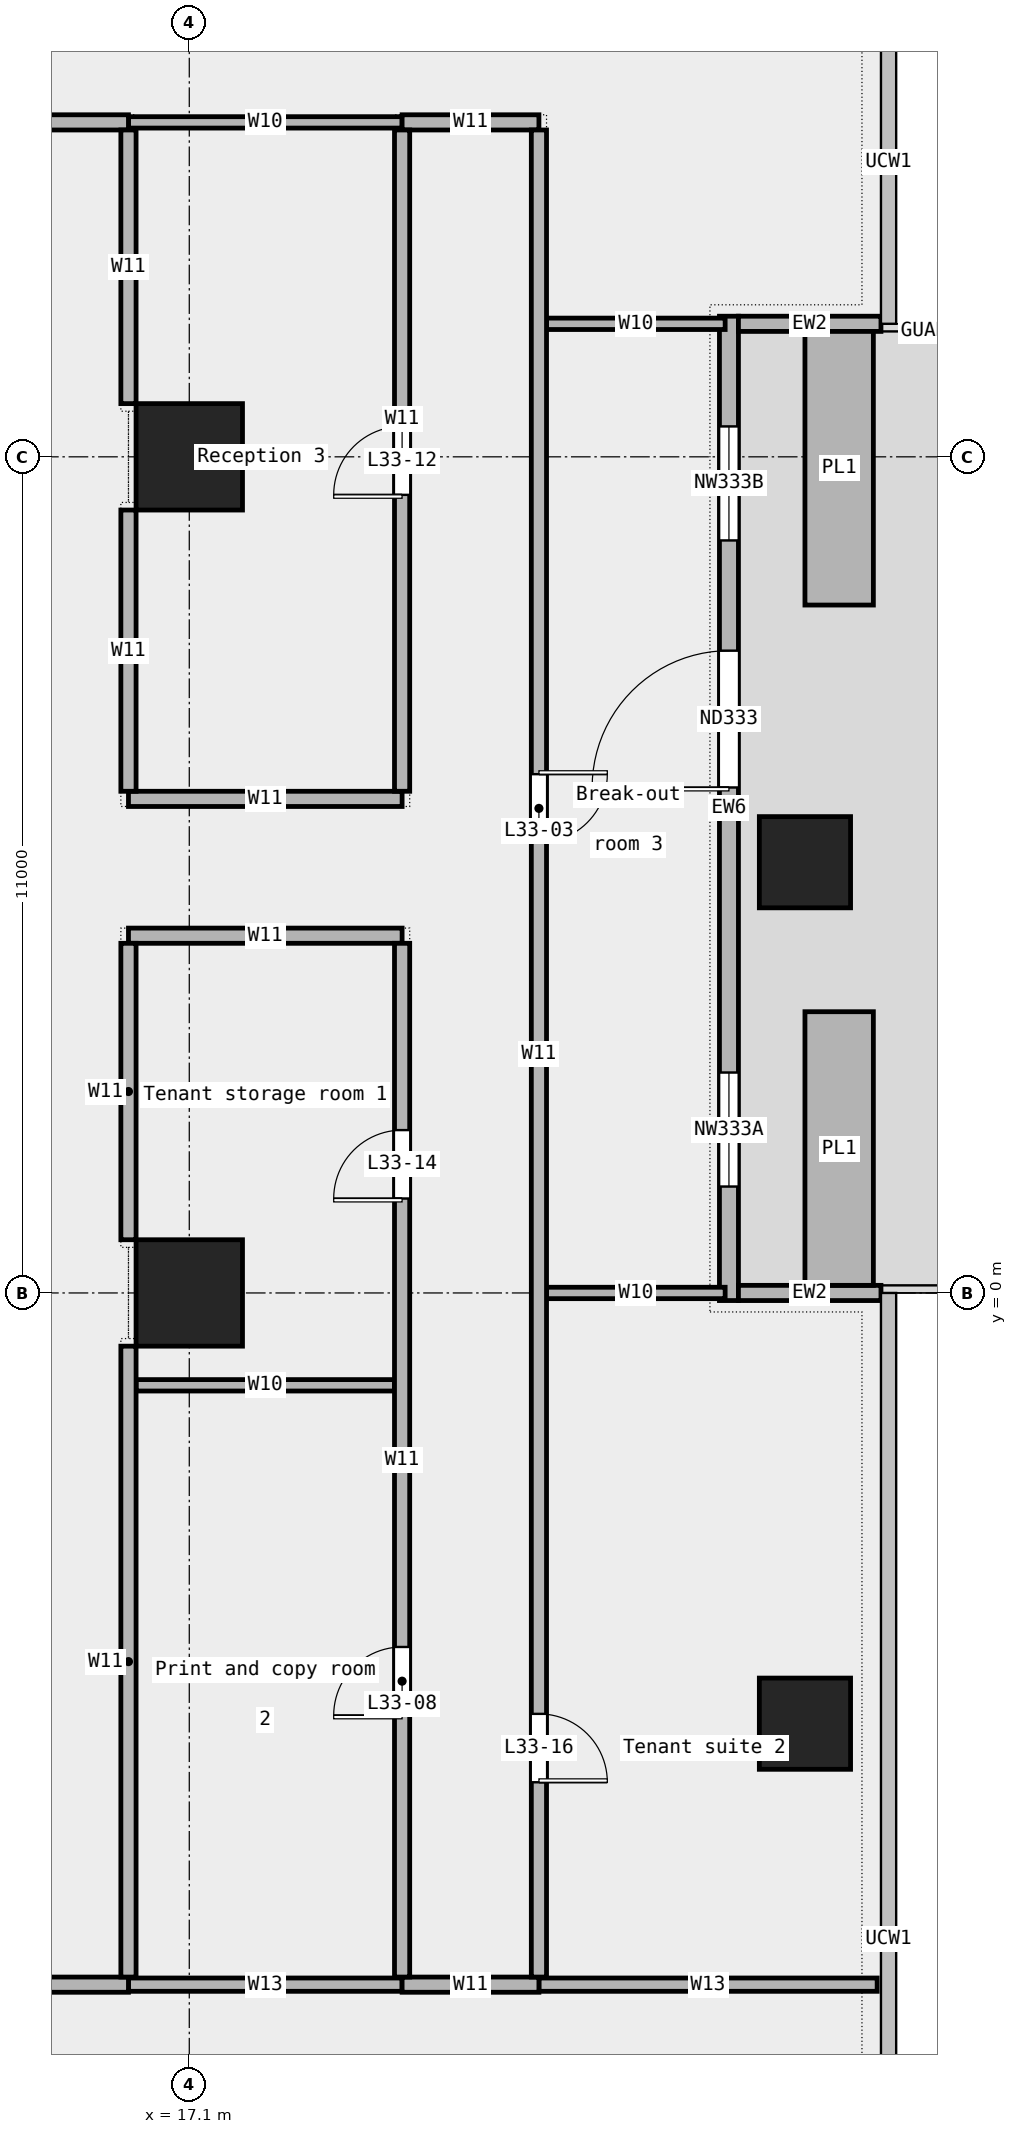
"""IFC4 building model, lengths in metres.
Left out: names, types, materials, properties, quantities, classifications, styles, units other than length and angle.
Written with IfcOpenShell. Run it as: python <this file> out.ifc"""

import sys

from ifc_helpers import new_model, si_unit, direction, frame, frame_2d, origin, origin_2d, place, context, subcontext, project, spatial, rectangle, extrude, element, fill, save


model = new_model("IFC4")
c1 = context("Model", 3, precision=1e-05, world=origin(), true_north=direction((0.0, 1.0)))
c2 = subcontext(c1, "Body", "Model", "MODEL_VIEW")
j1 = project(units=[si_unit("LENGTHUNIT", "METRE"), si_unit("PLANEANGLEUNIT", "RADIAN")], contexts=[c1])
p1 = place(None, origin())
s1 = spatial("IfcSite", under=j1, at=p1, CompositionType="ELEMENT")
p2 = place(p1, origin())
s2 = spatial("IfcBuilding", under=s1, at=p2, CompositionType="ELEMENT")
p3 = place(p2, frame((0.0, 0.0, 165.0)))
s3 = spatial("IfcBuildingStorey", under=s2, at=p3, CompositionType="ELEMENT", Elevation=165.0)
for number, where, z_axis, x_axis in (
    (1, (25.2, -5.667, 0.0), (0.0, 0.0, 1.0), (1.0, 0.0, 0.0)),
    (2, (25.2, 5.667, 0.0), (0.0, 0.0, 1.0), (1.0, 0.0, 0.0)),
):
    element("IfcColumn", number, at=place(p3, frame(where, z_axis=z_axis, x_axis=x_axis)), inside=s3, PredefinedType="COLUMN", context=c2, shape_type="SweptSolid", body=[
        extrude(rectangle(XDim=1.2, YDim=1.2, at=origin_2d()), origin(), (0.0, 0.0, 1.0), 3.6),
    ])
for number, where, z_axis, x_axis in (
    (3, (17.1, 0.0, 0.0), (0.0, 0.0, 1.0), (1.0, 0.0, 0.0)),
    (4, (17.1, 11.0, 0.0), (0.0, 0.0, 1.0), (1.0, 0.0, 0.0)),
):
    element("IfcColumn", number, at=place(p3, frame(where, z_axis=z_axis, x_axis=x_axis)), inside=s3, PredefinedType="COLUMN", context=c2, shape_type="SweptSolid", body=[
        extrude(rectangle(XDim=1.4, YDim=1.4, at=origin_2d()), origin(), (0.0, 0.0, 1.0), 3.6),
    ])
p4 = place(p3, frame((24.2, -0.1, 0.0), z_axis=(0.0, 0.0, 1.0), x_axis=(0.0, 1.0, 0.0)))
e5 = element("IfcWall", 5, at=p4, inside=s3, PredefinedType="STANDARD", context=c2, shape_type="SweptSolid", body=[
    extrude(rectangle(XDim=12.95, YDim=0.25, at=frame_2d((6.475, 0.0))), origin(), (0.0, 0.0, 1.0), 3.6),
])
p5 = place(p4, frame((1.5, 0.0, 0.45)))
e6 = element("IfcOpeningElement", 6, at=p5, cuts=e5, PredefinedType="OPENING", context=c2, shape_type="SweptSolid", body=[
    extrude(rectangle(XDim=1.5, YDim=2.4, at=frame_2d((0.75, 1.2))), frame((0.0, 0.137, 0.0), z_axis=(0.0, -1.0, 0.0), x_axis=(1.0, 0.0, 0.0)), (0.0, 0.0, 1.0), 0.274),
])
p6 = place(p4, frame((6.75, 0.0, 0.0)))
e7 = element("IfcOpeningElement", 7, at=p6, cuts=e5, PredefinedType="OPENING", context=c2, shape_type="SweptSolid", body=[
    extrude(rectangle(XDim=1.8, YDim=2.4, at=frame_2d((0.9, 1.2))), frame((0.0, 0.137, 0.0), z_axis=(0.0, -1.0, 0.0), x_axis=(1.0, 0.0, 0.0)), (0.0, 0.0, 1.0), 0.274),
])
p7 = place(p4, frame((10.0, 0.0, 0.45)))
e8 = element("IfcOpeningElement", 8, at=p7, cuts=e5, PredefinedType="OPENING", context=c2, shape_type="SweptSolid", body=[
    extrude(rectangle(XDim=1.5, YDim=2.4, at=frame_2d((0.75, 1.2))), frame((0.0, 0.137, 0.0), z_axis=(0.0, -1.0, 0.0), x_axis=(1.0, 0.0, 0.0)), (0.0, 0.0, 1.0), 0.274),
])
for number, where, z_axis, x_axis in (
    (9, (26.2, 0.0, 0.0), (0.0, 0.0, 1.0), (-1.0, 0.0, 0.0)),
    (10, (26.2, 12.75, 0.0), (0.0, 0.0, 1.0), (-1.0, 0.0, 0.0)),
):
    element("IfcWall", number, at=place(p3, frame(where, z_axis=z_axis, x_axis=x_axis)), inside=s3, PredefinedType="STANDARD", context=c2, shape_type="SweptSolid", body=[
        extrude(rectangle(XDim=1.875, YDim=0.2, at=frame_2d((0.938, 0.0))), origin(), (0.0, 0.0, 1.0), 3.6),
    ])
for number, where, z_axis, x_axis in (
    (11, (25.65, 0.1, 0.0), (0.0, 0.0, 1.0), (0.0, 1.0, 0.0)),
    (12, (25.65, 9.05, 0.0), (0.0, 0.0, 1.0), (0.0, 1.0, 0.0)),
):
    element("IfcWall", number, at=place(p3, frame(where, z_axis=z_axis, x_axis=x_axis)), inside=s3, PredefinedType="STANDARD", context=c2, shape_type="SweptSolid", body=[
        extrude(rectangle(XDim=3.6, YDim=0.9, at=frame_2d((1.8, 0.0))), origin(), (0.0, 0.0, 1.0), 0.7),
    ])
p8 = place(p3, frame((16.3, -9.1, 0.0), z_axis=(0.0, 0.0, 1.0), x_axis=(1.0, 0.0, 0.0)))
e13 = element("IfcWall", 13, at=p8, inside=s3, PredefinedType="PARTITIONING", context=c2, shape_type="SweptSolid", body=[
    extrude(rectangle(XDim=3.6, YDim=0.175, at=frame_2d((1.8, 0.0))), origin(), (0.0, 0.0, 1.0), 3.6),
])
p9 = place(p3, frame((21.7, -9.1, 0.0), z_axis=(0.0, 0.0, 1.0), x_axis=(1.0, 0.0, 0.0)))
e14 = element("IfcWall", 14, at=p9, inside=s3, PredefinedType="PARTITIONING", context=c2, shape_type="SweptSolid", body=[
    extrude(rectangle(XDim=4.45, YDim=0.175, at=frame_2d((2.225, 0.0))), origin(), (0.0, 0.0, 1.0), 3.6),
])
p10 = place(p3, frame((-9.48, -9.1, 0.0), z_axis=(0.0, 0.0, 1.0), x_axis=(1.0, 0.0, 0.0)))
e15 = element("IfcWall", 15, at=p10, inside=s3, PredefinedType="PARTITIONING", context=c2, shape_type="SweptSolid", body=[
    extrude(rectangle(XDim=25.78, YDim=0.2, at=frame_2d((12.89, 0.0))), origin(), (0.0, 0.0, 1.0), 3.6),
])
p11 = place(p3, frame((19.9, -9.1, 0.0), z_axis=(0.0, 0.0, 1.0), x_axis=(1.0, 0.0, 0.0)))
e16 = element("IfcWall", 16, at=p11, inside=s3, PredefinedType="PARTITIONING", context=c2, shape_type="SweptSolid", body=[
    extrude(rectangle(XDim=1.8, YDim=0.2, at=frame_2d((0.9, 0.0))), origin(), (0.0, 0.0, 1.0), 3.6),
])
p12 = place(p3, frame((16.4, -1.215, 0.0), z_axis=(0.0, 0.0, 1.0), x_axis=(1.0, 0.0, 0.0)))
e17 = element("IfcWall", 17, at=p12, inside=s3, PredefinedType="PARTITIONING", context=c2, shape_type="SweptSolid", body=[
    extrude(rectangle(XDim=3.4, YDim=0.15, at=frame_2d((1.7, 0.0))), origin(), (0.0, 0.0, 1.0), 3.6),
])
p13 = place(p3, frame((21.8, 0.0, 0.0), z_axis=(0.0, 0.0, 1.0), x_axis=(1.0, 0.0, 0.0)))
e18 = element("IfcWall", 18, at=p13, inside=s3, PredefinedType="PARTITIONING", context=c2, shape_type="SweptSolid", body=[
    extrude(rectangle(XDim=2.35, YDim=0.15, at=frame_2d((1.175, 0.0))), origin(), (0.0, 0.0, 1.0), 3.6),
])
for number, where, z_axis, x_axis in (
    (19, (16.3, 4.7, 0.0), (0.0, 0.0, 1.0), (1.0, 0.0, 0.0)),
    (20, (16.3, 6.5, 0.0), (0.0, 0.0, 1.0), (1.0, 0.0, 0.0)),
):
    element("IfcWall", number, at=place(p3, frame(where, z_axis=z_axis, x_axis=x_axis)), inside=s3, PredefinedType="PARTITIONING", context=c2, shape_type="SweptSolid", body=[
        extrude(rectangle(XDim=3.6, YDim=0.2, at=frame_2d((1.8, 0.0))), origin(), (0.0, 0.0, 1.0), 3.6),
    ])
p14 = place(p3, frame((21.8, 12.75, 0.0), z_axis=(0.0, 0.0, 1.0), x_axis=(1.0, 0.0, 0.0)))
e21 = element("IfcWall", 21, at=p14, inside=s3, PredefinedType="PARTITIONING", context=c2, shape_type="SweptSolid", body=[
    extrude(rectangle(XDim=2.35, YDim=0.15, at=frame_2d((1.175, 0.0))), origin(), (0.0, 0.0, 1.0), 3.6),
])
p15 = place(p3, frame((16.3, 15.4, 0.0), z_axis=(0.0, 0.0, 1.0), x_axis=(1.0, 0.0, 0.0)))
e22 = element("IfcWall", 22, at=p15, inside=s3, PredefinedType="PARTITIONING", context=c2, shape_type="SweptSolid", body=[
    extrude(rectangle(XDim=3.6, YDim=0.15, at=frame_2d((1.8, 0.0))), origin(), (0.0, 0.0, 1.0), 3.6),
])
p16 = place(p3, frame((-16.3, 15.4, 0.0), z_axis=(0.0, 0.0, 1.0), x_axis=(1.0, 0.0, 0.0)))
e23 = element("IfcWall", 23, at=p16, inside=s3, PredefinedType="PARTITIONING", context=c2, shape_type="SweptSolid", body=[
    extrude(rectangle(XDim=32.6, YDim=0.2, at=frame_2d((16.3, 0.0))), origin(), (0.0, 0.0, 1.0), 3.6),
])
p17 = place(p16, frame((24.992, 0.0, 0.0)))
e24 = element("IfcOpeningElement", 24, at=p17, cuts=e23, PredefinedType="OPENING", context=c2, shape_type="SweptSolid", body=[
    extrude(rectangle(XDim=1.8, YDim=2.1, at=frame_2d((0.9, 1.05))), frame((0.0, 0.112, 0.0), z_axis=(0.0, -1.0, 0.0), x_axis=(1.0, 0.0, 0.0)), (0.0, 0.0, 1.0), 0.224),
])
p18 = place(p16, frame((9.635, 0.0, 0.0)))
e25 = element("IfcOpeningElement", 25, at=p18, cuts=e23, PredefinedType="OPENING", context=c2, shape_type="SweptSolid", body=[
    extrude(rectangle(XDim=1.8, YDim=2.1, at=frame_2d((0.9, 1.05))), frame((0.0, 0.112, 0.0), z_axis=(0.0, -1.0, 0.0), x_axis=(1.0, 0.0, 0.0)), (0.0, 0.0, 1.0), 0.224),
])
p19 = place(p3, frame((19.9, 15.4, 0.0), z_axis=(0.0, 0.0, 1.0), x_axis=(1.0, 0.0, 0.0)))
e26 = element("IfcWall", 26, at=p19, inside=s3, PredefinedType="PARTITIONING", context=c2, shape_type="SweptSolid", body=[
    extrude(rectangle(XDim=1.8, YDim=0.2, at=frame_2d((0.9, 0.0))), origin(), (0.0, 0.0, 1.0), 3.6),
])
p20 = place(p3, frame((16.3, -9.0, 0.0), z_axis=(0.0, 0.0, 1.0), x_axis=(0.0, 1.0, 0.0)))
e27 = element("IfcWall", 27, at=p20, inside=s3, PredefinedType="PARTITIONING", context=c2, shape_type="SweptSolid", body=[
    extrude(rectangle(XDim=8.3, YDim=0.2, at=frame_2d((4.15, 0.0))), origin(), (0.0, 0.0, 1.0), 3.6),
])
p21 = place(p3, frame((16.3, 0.7, 0.0), z_axis=(0.0, 0.0, 1.0), x_axis=(0.0, 1.0, 0.0)))
e28 = element("IfcWall", 28, at=p21, inside=s3, PredefinedType="PARTITIONING", context=c2, shape_type="SweptSolid", body=[
    extrude(rectangle(XDim=3.9, YDim=0.2, at=frame_2d((1.95, 0.0))), origin(), (0.0, 0.0, 1.0), 3.6),
])
p22 = place(p3, frame((16.3, 6.6, 0.0), z_axis=(0.0, 0.0, 1.0), x_axis=(0.0, 1.0, 0.0)))
e29 = element("IfcWall", 29, at=p22, inside=s3, PredefinedType="PARTITIONING", context=c2, shape_type="SweptSolid", body=[
    extrude(rectangle(XDim=3.7, YDim=0.2, at=frame_2d((1.85, 0.0))), origin(), (0.0, 0.0, 1.0), 3.6),
])
p23 = place(p3, frame((16.3, 11.7, 0.0), z_axis=(0.0, 0.0, 1.0), x_axis=(0.0, 1.0, 0.0)))
e30 = element("IfcWall", 30, at=p23, inside=s3, PredefinedType="PARTITIONING", context=c2, shape_type="SweptSolid", body=[
    extrude(rectangle(XDim=3.6, YDim=0.2, at=frame_2d((1.8, 0.0))), origin(), (0.0, 0.0, 1.0), 3.6),
])
p24 = place(p3, frame((19.9, -9.0, 0.0), z_axis=(0.0, 0.0, 1.0), x_axis=(0.0, 1.0, 0.0)))
e31 = element("IfcWall", 31, at=p24, inside=s3, PredefinedType="PARTITIONING", context=c2, shape_type="SweptSolid", body=[
    extrude(rectangle(XDim=13.6, YDim=0.2, at=frame_2d((6.8, 0.0))), origin(), (0.0, 0.0, 1.0), 3.6),
])
p25 = place(p24, frame((3.442, 0.0, 0.0)))
e32 = element("IfcOpeningElement", 32, at=p25, cuts=e31, PredefinedType="OPENING", context=c2, shape_type="SweptSolid", body=[
    extrude(rectangle(XDim=0.9, YDim=2.1, at=frame_2d((0.45, 1.05))), frame((0.0, 0.112, 0.0), z_axis=(0.0, -1.0, 0.0), x_axis=(1.0, 0.0, 0.0)), (0.0, 0.0, 1.0), 0.224),
])
p26 = place(p24, frame((10.242, 0.0, 0.0)))
e33 = element("IfcOpeningElement", 33, at=p26, cuts=e31, PredefinedType="OPENING", context=c2, shape_type="SweptSolid", body=[
    extrude(rectangle(XDim=0.9, YDim=2.1, at=frame_2d((0.45, 1.05))), frame((0.0, 0.112, 0.0), z_axis=(0.0, -1.0, 0.0), x_axis=(1.0, 0.0, 0.0)), (0.0, 0.0, 1.0), 0.224),
])
p27 = place(p3, frame((19.9, 6.6, 0.0), z_axis=(0.0, 0.0, 1.0), x_axis=(0.0, 1.0, 0.0)))
e34 = element("IfcWall", 34, at=p27, inside=s3, PredefinedType="PARTITIONING", context=c2, shape_type="SweptSolid", body=[
    extrude(rectangle(XDim=8.7, YDim=0.2, at=frame_2d((4.35, 0.0))), origin(), (0.0, 0.0, 1.0), 3.6),
])
p28 = place(p27, frame((3.9, 0.0, 0.0)))
e35 = element("IfcOpeningElement", 35, at=p28, cuts=e34, PredefinedType="OPENING", context=c2, shape_type="SweptSolid", body=[
    extrude(rectangle(XDim=0.9, YDim=2.1, at=frame_2d((0.45, 1.05))), frame((0.0, 0.112, 0.0), z_axis=(0.0, -1.0, 0.0), x_axis=(1.0, 0.0, 0.0)), (0.0, 0.0, 1.0), 0.224),
])
p29 = place(p3, frame((21.7, -9.0, 0.0), z_axis=(0.0, 0.0, 1.0), x_axis=(0.0, 1.0, 0.0)))
e36 = element("IfcWall", 36, at=p29, inside=s3, PredefinedType="PARTITIONING", context=c2, shape_type="SweptSolid", body=[
    extrude(rectangle(XDim=24.3, YDim=0.2, at=frame_2d((12.15, 0.0))), origin(), (0.0, 0.0, 1.0), 3.6),
])
p30 = place(p29, frame((14.925, 0.0, 0.0)))
e37 = element("IfcOpeningElement", 37, at=p30, cuts=e36, PredefinedType="OPENING", context=c2, shape_type="SweptSolid", body=[
    extrude(rectangle(XDim=0.9, YDim=2.1, at=frame_2d((0.45, 1.05))), frame((0.0, 0.112, 0.0), z_axis=(0.0, -1.0, 0.0), x_axis=(1.0, 0.0, 0.0)), (0.0, 0.0, 1.0), 0.224),
])
p31 = place(p29, frame((2.562, 0.0, 0.0)))
e38 = element("IfcOpeningElement", 38, at=p31, cuts=e36, PredefinedType="OPENING", context=c2, shape_type="SweptSolid", body=[
    extrude(rectangle(XDim=0.9, YDim=2.1, at=frame_2d((0.45, 1.05))), frame((0.0, 0.112, 0.0), z_axis=(0.0, -1.0, 0.0), x_axis=(1.0, 0.0, 0.0)), (0.0, 0.0, 1.0), 0.224),
])
p32 = place(p5, origin())
e39 = element("IfcWindow", 39, at=p32, inside=s3, PartitioningType="SINGLE_PANEL", PredefinedType="WINDOW", context=c2, shape_type="SweptSolid", body=[
    extrude(rectangle(XDim=1.5, YDim=2.4, at=frame_2d((0.75, 1.2))), frame((0.0, 0.03, 0.0), z_axis=(0.0, -1.0, 0.0), x_axis=(1.0, 0.0, 0.0)), (0.0, 0.0, 1.0), 0.06),
])
fill(e6, e39)
p33 = place(p6, origin())
e40 = element("IfcDoor", 40, at=p33, inside=s3, OperationType="DOUBLE_DOOR_SINGLE_SWING", PredefinedType="DOOR", context=c2, shape_type="SweptSolid", body=[
    extrude(rectangle(XDim=1.8, YDim=2.4, at=frame_2d((0.9, 1.2))), frame((0.0, 0.025, 0.0), z_axis=(0.0, -1.0, 0.0), x_axis=(1.0, 0.0, 0.0)), (0.0, 0.0, 1.0), 0.05),
])
fill(e7, e40)
p34 = place(p7, origin())
e41 = element("IfcWindow", 41, at=p34, inside=s3, PartitioningType="SINGLE_PANEL", PredefinedType="WINDOW", context=c2, shape_type="SweptSolid", body=[
    extrude(rectangle(XDim=1.5, YDim=2.4, at=frame_2d((0.75, 1.2))), frame((0.0, 0.03, 0.0), z_axis=(0.0, -1.0, 0.0), x_axis=(1.0, 0.0, 0.0)), (0.0, 0.0, 1.0), 0.06),
])
fill(e8, e41)
p35 = place(p30, origin())
e42 = element("IfcDoor", 42, at=p35, inside=s3, OperationType="SINGLE_SWING_LEFT", PredefinedType="DOOR", context=c2, shape_type="SweptSolid", body=[
    extrude(rectangle(XDim=0.9, YDim=2.1, at=frame_2d((0.45, 1.05))), frame((0.0, 0.025, 0.0), z_axis=(0.0, -1.0, 0.0), x_axis=(1.0, 0.0, 0.0)), (0.0, 0.0, 1.0), 0.05),
])
fill(e37, e42)
p36 = place(p25, origin())
e43 = element("IfcDoor", 43, at=p36, inside=s3, OperationType="SINGLE_SWING_LEFT", PredefinedType="DOOR", context=c2, shape_type="SweptSolid", body=[
    extrude(rectangle(XDim=0.9, YDim=2.1, at=frame_2d((0.45, 1.05))), frame((0.0, 0.025, 0.0), z_axis=(0.0, -1.0, 0.0), x_axis=(1.0, 0.0, 0.0)), (0.0, 0.0, 1.0), 0.05),
])
fill(e32, e43)
p37 = place(p28, origin())
e44 = element("IfcDoor", 44, at=p37, inside=s3, OperationType="SINGLE_SWING_LEFT", PredefinedType="DOOR", context=c2, shape_type="SweptSolid", body=[
    extrude(rectangle(XDim=0.9, YDim=2.1, at=frame_2d((0.45, 1.05))), frame((0.0, 0.025, 0.0), z_axis=(0.0, -1.0, 0.0), x_axis=(1.0, 0.0, 0.0)), (0.0, 0.0, 1.0), 0.05),
])
fill(e35, e44)
p38 = place(p26, origin())
e45 = element("IfcDoor", 45, at=p38, inside=s3, OperationType="SINGLE_SWING_LEFT", PredefinedType="DOOR", context=c2, shape_type="SweptSolid", body=[
    extrude(rectangle(XDim=0.9, YDim=2.1, at=frame_2d((0.45, 1.05))), frame((0.0, 0.025, 0.0), z_axis=(0.0, -1.0, 0.0), x_axis=(1.0, 0.0, 0.0)), (0.0, 0.0, 1.0), 0.05),
])
fill(e33, e45)
p39 = place(p31, origin())
e46 = element("IfcDoor", 46, at=p39, inside=s3, OperationType="SINGLE_SWING_RIGHT", PredefinedType="DOOR", context=c2, shape_type="SweptSolid", body=[
    extrude(rectangle(XDim=0.9, YDim=2.1, at=frame_2d((0.45, 1.05))), frame((0.0, 0.025, 0.0), z_axis=(0.0, -1.0, 0.0), x_axis=(1.0, 0.0, 0.0)), (0.0, 0.0, 1.0), 0.05),
])
fill(e38, e46)
save(model, sys.argv[1])
